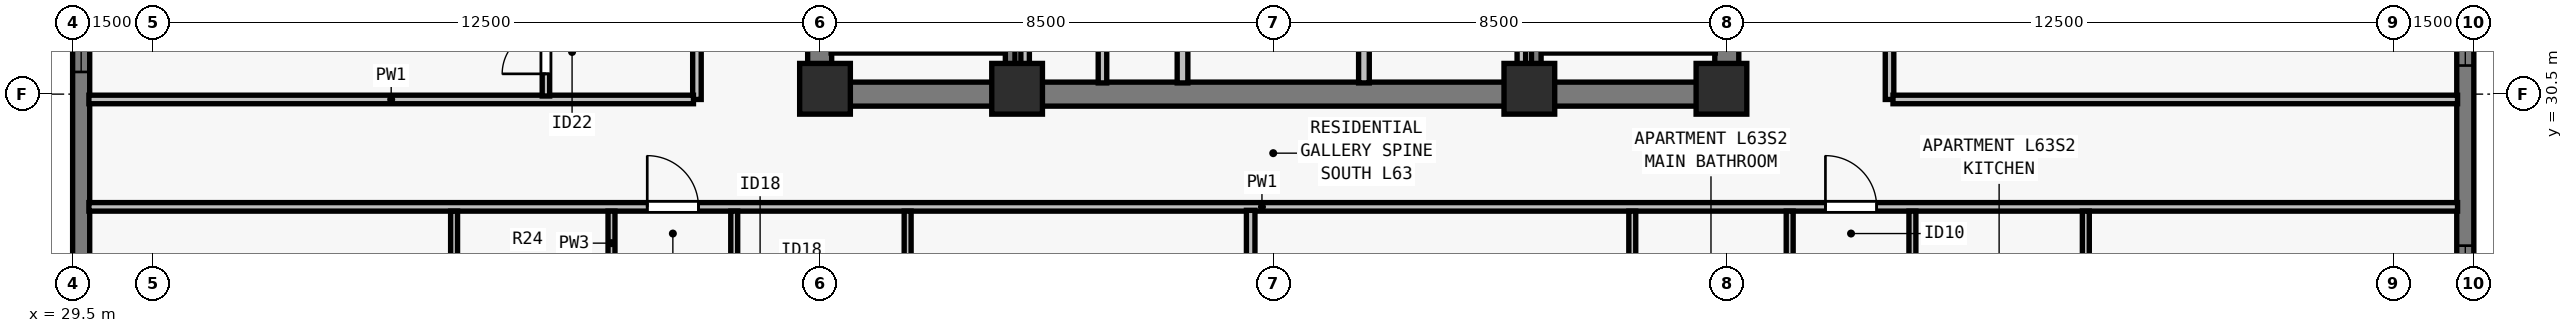
"""IFC4 building model, lengths in metres.
Left out: names, types, materials, properties, quantities, classifications, styles, units other than length and angle.
Written with IfcOpenShell. Run it as: python <this file> out.ifc"""

import sys

from ifc_helpers import new_model, si_unit, direction, frame, frame_2d, origin, origin_2d, place, context, subcontext, project, spatial, rectangle, extrude, element, fill, save


model = new_model("IFC4")
c1 = context("Model", 3, precision=1e-05, world=origin(), true_north=direction((0.0, 1.0)))
c2 = subcontext(c1, "Body", "Model", "MODEL_VIEW")
j1 = project(units=[si_unit("LENGTHUNIT", "METRE"), si_unit("PLANEANGLEUNIT", "RADIAN")], contexts=[c1])
p1 = place(None, origin())
s1 = spatial("IfcSite", under=j1, at=p1, CompositionType="ELEMENT")
p2 = place(p1, origin())
s2 = spatial("IfcBuilding", under=s1, at=p2, CompositionType="ELEMENT")
p3 = place(p2, frame((0.0, 0.0, 230.5)))
s3 = spatial("IfcBuildingStorey", under=s2, at=p3, CompositionType="ELEMENT", Elevation=230.5)
for number, where, z_axis, x_axis in (
    (1, (43.6, 30.6, 0.0), (0.0, 0.0, 1.0), (1.0, 0.0, 0.0)),
    (2, (47.2, 30.6, 0.0), (0.0, 0.0, 1.0), (1.0, 0.0, 0.0)),
    (3, (56.8, 30.6, 0.0), (0.0, 0.0, 1.0), (1.0, 0.0, 0.0)),
    (4, (60.4, 30.6, 0.0), (0.0, 0.0, 1.0), (1.0, 0.0, 0.0)),
):
    element("IfcColumn", number, at=place(p3, frame(where, z_axis=z_axis, x_axis=x_axis)), inside=s3, PredefinedType="COLUMN", context=c2, shape_type="SweptSolid", body=[
        extrude(rectangle(XDim=0.95, YDim=0.95, at=origin_2d()), origin(), (0.0, 0.0, 1.0), 3.5),
    ])
p4 = place(p3, frame((74.34, 56.5, 0.0), z_axis=(0.0, 0.0, 1.0), x_axis=(0.0, -1.0, 0.0)))
e5 = element("IfcWall", 5, at=p4, inside=s3, PredefinedType="SOLIDWALL", context=c2, shape_type="SweptSolid", body=[
    extrude(rectangle(XDim=34.702, YDim=0.32, at=frame_2d((17.351, 0.0))), origin(), (0.0, 0.0, 1.0), 3.29),
])
p5 = place(p4, frame((4.613, 0.0, 0.8)))
e6 = element("IfcOpeningElement", 6, at=p5, cuts=e5, PredefinedType="OPENING", context=c2, shape_type="SweptSolid", body=[
    extrude(rectangle(XDim=1.85, YDim=1.678, at=frame_2d((0.925, 0.839))), frame((0.0, 0.17, 0.0), z_axis=(0.0, -1.0, 0.0), x_axis=(1.0, 0.0, 0.0)), (0.0, 0.0, 1.0), 0.34),
])
p6 = place(p4, frame((9.388, 0.0, 0.8)))
e7 = element("IfcOpeningElement", 7, at=p6, cuts=e5, PredefinedType="OPENING", context=c2, shape_type="SweptSolid", body=[
    extrude(rectangle(XDim=1.55, YDim=1.678, at=frame_2d((0.775, 0.839))), frame((0.0, 0.17, 0.0), z_axis=(0.0, -1.0, 0.0), x_axis=(1.0, 0.0, 0.0)), (0.0, 0.0, 1.0), 0.34),
])
p7 = place(p4, frame((14.888, 0.0, 0.8)))
e8 = element("IfcOpeningElement", 8, at=p7, cuts=e5, PredefinedType="OPENING", context=c2, shape_type="SweptSolid", body=[
    extrude(rectangle(XDim=1.55, YDim=1.678, at=frame_2d((0.775, 0.839))), frame((0.0, 0.17, 0.0), z_axis=(0.0, -1.0, 0.0), x_axis=(1.0, 0.0, 0.0)), (0.0, 0.0, 1.0), 0.34),
])
p8 = place(p4, frame((18.114, 0.0, 0.8)))
e9 = element("IfcOpeningElement", 9, at=p8, cuts=e5, PredefinedType="OPENING", context=c2, shape_type="SweptSolid", body=[
    extrude(rectangle(XDim=1.85, YDim=1.678, at=frame_2d((0.925, 0.839))), frame((0.0, 0.17, 0.0), z_axis=(0.0, -1.0, 0.0), x_axis=(1.0, 0.0, 0.0)), (0.0, 0.0, 1.0), 0.34),
])
p9 = place(p4, frame((23.614, 0.0, 0.8)))
e10 = element("IfcOpeningElement", 10, at=p9, cuts=e5, PredefinedType="OPENING", context=c2, shape_type="SweptSolid", body=[
    extrude(rectangle(XDim=1.85, YDim=1.678, at=frame_2d((0.925, 0.839))), frame((0.0, 0.17, 0.0), z_axis=(0.0, -1.0, 0.0), x_axis=(1.0, 0.0, 0.0)), (0.0, 0.0, 1.0), 0.34),
])
p10 = place(p4, frame((28.839, 0.0, 0.8)))
e11 = element("IfcOpeningElement", 11, at=p10, cuts=e5, PredefinedType="OPENING", context=c2, shape_type="SweptSolid", body=[
    extrude(rectangle(XDim=1.55, YDim=1.678, at=frame_2d((0.775, 0.839))), frame((0.0, 0.17, 0.0), z_axis=(0.0, -1.0, 0.0), x_axis=(1.0, 0.0, 0.0)), (0.0, 0.0, 1.0), 0.34),
])
p11 = place(p4, frame((31.35, 0.0, 0.8)))
e12 = element("IfcOpeningElement", 12, at=p11, cuts=e5, PredefinedType="OPENING", context=c2, shape_type="SweptSolid", body=[
    extrude(rectangle(XDim=0.9, YDim=1.678, at=frame_2d((0.45, 0.839))), frame((0.0, 0.17, 0.0), z_axis=(0.0, -1.0, 0.0), x_axis=(1.0, 0.0, 0.0)), (0.0, 0.0, 1.0), 0.34),
])
p12 = place(p3, frame((29.66, 21.5, 0.0), z_axis=(0.0, 0.0, 1.0), x_axis=(0.0, 1.0, 0.0)))
e13 = element("IfcWall", 13, at=p12, inside=s3, PredefinedType="SOLIDWALL", context=c2, shape_type="SweptSolid", body=[
    extrude(rectangle(XDim=23.402, YDim=0.32, at=frame_2d((11.701, 0.0))), origin(), (0.0, 0.0, 1.0), 3.29),
])
p13 = place(p12, frame((9.416, 0.0, 0.8)))
e14 = element("IfcOpeningElement", 14, at=p13, cuts=e13, PredefinedType="OPENING", context=c2, shape_type="SweptSolid", body=[
    extrude(rectangle(XDim=1.55, YDim=1.678, at=frame_2d((0.775, 0.839))), frame((0.0, 0.17, 0.0), z_axis=(0.0, -1.0, 0.0), x_axis=(1.0, 0.0, 0.0)), (0.0, 0.0, 1.0), 0.34),
])
p14 = place(p12, frame((15.886, 0.0, 0.8)))
e15 = element("IfcOpeningElement", 15, at=p14, cuts=e13, PredefinedType="OPENING", context=c2, shape_type="SweptSolid", body=[
    extrude(rectangle(XDim=1.55, YDim=1.678, at=frame_2d((0.775, 0.839))), frame((0.0, 0.17, 0.0), z_axis=(0.0, -1.0, 0.0), x_axis=(1.0, 0.0, 0.0)), (0.0, 0.0, 1.0), 0.34),
])
p15 = place(p12, frame((19.397, 0.0, 0.8)))
e16 = element("IfcOpeningElement", 16, at=p15, cuts=e13, PredefinedType="OPENING", context=c2, shape_type="SweptSolid", body=[
    extrude(rectangle(XDim=1.85, YDim=1.678, at=frame_2d((0.925, 0.839))), frame((0.0, 0.17, 0.0), z_axis=(0.0, -1.0, 0.0), x_axis=(1.0, 0.0, 0.0)), (0.0, 0.0, 1.0), 0.34),
])
p16 = place(p3, frame((43.275, 30.5, 0.0), z_axis=(0.0, 0.0, 1.0), x_axis=(1.0, 0.0, 0.0)))
e17 = element("IfcWall", 17, at=p16, inside=s3, PredefinedType="SHEAR", context=c2, shape_type="SweptSolid", body=[
    extrude(rectangle(XDim=17.45, YDim=0.45, at=frame_2d((8.725, 0.0))), origin(), (0.0, 0.0, 1.0), 3.29),
])
for number, where, z_axis, x_axis in (
    (18, (43.5, 30.715, 0.0), (0.0, 0.0, 1.0), (0.0, 1.0, 0.0)),
    (19, (60.5, 30.715, 0.0), (0.0, 0.0, 1.0), (0.0, 1.0, 0.0)),
):
    element("IfcWall", number, at=place(p3, frame(where, z_axis=z_axis, x_axis=x_axis)), inside=s3, PredefinedType="SHEAR", context=c2, shape_type="SweptSolid", body=[
        extrude(rectangle(XDim=8.035, YDim=0.45, at=frame_2d((4.018, 0.0))), origin(), (0.0, 0.0, 1.0), 3.29),
    ])
p17 = place(p3, frame((50.3, 30.71, 0.0), z_axis=(0.0, 0.0, 1.0), x_axis=(0.0, 1.0, 0.0)))
e20 = element("IfcWall", 20, at=p17, inside=s3, PredefinedType="SOLIDWALL", context=c2, shape_type="SweptSolid", body=[
    extrude(rectangle(XDim=7.905, YDim=0.2, at=frame_2d((3.953, 0.0))), origin(), (0.0, 0.0, 1.0), 3.29),
])
p18 = place(p17, frame((2.14, 0.0, 0.0)))
e21 = element("IfcOpeningElement", 21, at=p18, cuts=e20, PredefinedType="OPENING", context=c2, shape_type="SweptSolid", body=[
    extrude(rectangle(XDim=0.95, YDim=2.12, at=frame_2d((0.475, 1.06))), frame((0.0, 0.11, 0.0), z_axis=(0.0, -1.0, 0.0), x_axis=(1.0, 0.0, 0.0)), (0.0, 0.0, 1.0), 0.22),
])
p19 = place(p3, frame((53.7, 30.71, 0.0), z_axis=(0.0, 0.0, 1.0), x_axis=(0.0, 1.0, 0.0)))
e22 = element("IfcWall", 22, at=p19, inside=s3, PredefinedType="SOLIDWALL", context=c2, shape_type="SweptSolid", body=[
    extrude(rectangle(XDim=7.905, YDim=0.2, at=frame_2d((3.953, 0.0))), origin(), (0.0, 0.0, 1.0), 3.29),
])
p20 = place(p19, frame((1.39, 0.0, 0.0)))
e23 = element("IfcOpeningElement", 23, at=p20, cuts=e22, PredefinedType="OPENING", context=c2, shape_type="SweptSolid", body=[
    extrude(rectangle(XDim=0.95, YDim=2.12, at=frame_2d((0.475, 1.06))), frame((0.0, 0.11, 0.0), z_axis=(0.0, -1.0, 0.0), x_axis=(1.0, 0.0, 0.0)), (0.0, 0.0, 1.0), 0.22),
])
p21 = place(p19, frame((5.39, 0.0, 0.0)))
e24 = element("IfcOpeningElement", 24, at=p21, cuts=e22, PredefinedType="OPENING", context=c2, shape_type="SweptSolid", body=[
    extrude(rectangle(XDim=0.85, YDim=2.12, at=frame_2d((0.425, 1.06))), frame((0.0, 0.11, 0.0), z_axis=(0.0, -1.0, 0.0), x_axis=(1.0, 0.0, 0.0)), (0.0, 0.0, 1.0), 0.22),
])
p22 = place(p3, frame((47.35, 30.71, 0.0), z_axis=(0.0, 0.0, 1.0), x_axis=(0.0, 1.0, 0.0)))
e25 = element("IfcWall", 25, at=p22, inside=s3, PredefinedType="PARTITIONING", context=c2, shape_type="SweptSolid", body=[
    extrude(rectangle(XDim=7.905, YDim=0.16, at=frame_2d((3.953, 0.0))), origin(), (0.0, 0.0, 1.0), 3.29),
])
p23 = place(p3, frame((48.8, 30.71, 0.0), z_axis=(0.0, 0.0, 1.0), x_axis=(0.0, 1.0, 0.0)))
e26 = element("IfcWall", 26, at=p23, inside=s3, PredefinedType="PARTITIONING", context=c2, shape_type="SweptSolid", body=[
    extrude(rectangle(XDim=7.905, YDim=0.16, at=frame_2d((3.953, 0.0))), origin(), (0.0, 0.0, 1.0), 3.29),
])
p24 = place(p23, frame((3.54, 0.0, 0.0)))
e27 = element("IfcOpeningElement", 27, at=p24, cuts=e26, PredefinedType="OPENING", context=c2, shape_type="SweptSolid", body=[
    extrude(rectangle(XDim=0.85, YDim=2.12, at=frame_2d((0.425, 1.06))), frame((0.0, 0.09, 0.0), z_axis=(0.0, -1.0, 0.0), x_axis=(1.0, 0.0, 0.0)), (0.0, 0.0, 1.0), 0.18),
])
p25 = place(p3, frame((56.65, 30.71, 0.0), z_axis=(0.0, 0.0, 1.0), x_axis=(0.0, 1.0, 0.0)))
e28 = element("IfcWall", 28, at=p25, inside=s3, PredefinedType="PARTITIONING", context=c2, shape_type="SweptSolid", body=[
    extrude(rectangle(XDim=7.905, YDim=0.16, at=frame_2d((3.953, 0.0))), origin(), (0.0, 0.0, 1.0), 3.29),
])
p26 = place(p3, frame((29.805, 28.387, 0.0), z_axis=(0.0, 0.0, 1.0), x_axis=(1.0, 0.0, 0.0)))
e29 = element("IfcWall", 29, at=p26, inside=s3, PredefinedType="PARTITIONING", context=c2, shape_type="SweptSolid", body=[
    extrude(rectangle(XDim=44.39, YDim=0.16, at=frame_2d((22.195, 0.0))), origin(), (0.0, 0.0, 1.0), 2.958),
])
p27 = place(p26, frame((10.464, 0.0, 0.0)))
e30 = element("IfcOpeningElement", 30, at=p27, cuts=e29, PredefinedType="OPENING", context=c2, shape_type="SweptSolid", body=[
    extrude(rectangle(XDim=0.96, YDim=2.18, at=frame_2d((0.48, 1.09))), frame((0.0, 0.09, 0.0), z_axis=(0.0, -1.0, 0.0), x_axis=(1.0, 0.0, 0.0)), (0.0, 0.0, 1.0), 0.18),
])
p28 = place(p26, frame((32.544, 0.0, 0.0)))
e31 = element("IfcOpeningElement", 31, at=p28, cuts=e29, PredefinedType="OPENING", context=c2, shape_type="SweptSolid", body=[
    extrude(rectangle(XDim=0.96, YDim=2.18, at=frame_2d((0.48, 1.09))), frame((0.0, 0.09, 0.0), z_axis=(0.0, -1.0, 0.0), x_axis=(1.0, 0.0, 0.0)), (0.0, 0.0, 1.0), 0.18),
])
p29 = place(p3, frame((41.2, 30.4, 0.0), z_axis=(0.0, 0.0, 1.0), x_axis=(0.0, 1.0, 0.0)))
e32 = element("IfcWall", 32, at=p29, inside=s3, PredefinedType="PARTITIONING", context=c2, shape_type="SweptSolid", body=[
    extrude(rectangle(XDim=17.2, YDim=0.16, at=frame_2d((8.6, 0.0))), origin(), (0.0, 0.0, 1.0), 3.29),
])
p30 = place(p29, frame((8.12, 0.0, 0.0)))
e33 = element("IfcOpeningElement", 33, at=p30, cuts=e32, PredefinedType="OPENING", context=c2, shape_type="SweptSolid", body=[
    extrude(rectangle(XDim=0.96, YDim=2.18, at=frame_2d((0.48, 1.09))), frame((0.0, 0.09, 0.0), z_axis=(0.0, -1.0, 0.0), x_axis=(1.0, 0.0, 0.0)), (0.0, 0.0, 1.0), 0.18),
])
p31 = place(p3, frame((63.55, 30.4, 0.0), z_axis=(0.0, 0.0, 1.0), x_axis=(0.0, 1.0, 0.0)))
e34 = element("IfcWall", 34, at=p31, inside=s3, PredefinedType="PARTITIONING", context=c2, shape_type="SweptSolid", body=[
    extrude(rectangle(XDim=17.2, YDim=0.16, at=frame_2d((8.6, 0.0))), origin(), (0.0, 0.0, 1.0), 3.29),
])
p32 = place(p31, frame((3.6, 0.0, 0.0)))
e35 = element("IfcOpeningElement", 35, at=p32, cuts=e34, PredefinedType="OPENING", context=c2, shape_type="SweptSolid", body=[
    extrude(rectangle(XDim=0.96, YDim=2.12, at=frame_2d((0.48, 1.06))), frame((0.0, 0.09, 0.0), z_axis=(0.0, -1.0, 0.0), x_axis=(1.0, 0.0, 0.0)), (0.0, 0.0, 1.0), 0.18),
])
p33 = place(p31, frame((12.44, 0.0, 0.0)))
e36 = element("IfcOpeningElement", 36, at=p33, cuts=e34, PredefinedType="OPENING", context=c2, shape_type="SweptSolid", body=[
    extrude(rectangle(XDim=0.96, YDim=2.18, at=frame_2d((0.48, 1.09))), frame((0.0, 0.09, 0.0), z_axis=(0.0, -1.0, 0.0), x_axis=(1.0, 0.0, 0.0)), (0.0, 0.0, 1.0), 0.18),
])
p34 = place(p3, frame((29.805, 30.4, 0.0), z_axis=(0.0, 0.0, 1.0), x_axis=(1.0, 0.0, 0.0)))
e37 = element("IfcWall", 37, at=p34, inside=s3, PredefinedType="PARTITIONING", context=c2, shape_type="SweptSolid", body=[
    extrude(rectangle(XDim=11.33, YDim=0.16, at=frame_2d((5.665, 0.0))), origin(), (0.0, 0.0, 1.0), 3.29),
])
p35 = place(p3, frame((63.615, 30.4, 0.0), z_axis=(0.0, 0.0, 1.0), x_axis=(1.0, 0.0, 0.0)))
e38 = element("IfcWall", 38, at=p35, inside=s3, PredefinedType="PARTITIONING", context=c2, shape_type="SweptSolid", body=[
    extrude(rectangle(XDim=10.58, YDim=0.16, at=frame_2d((5.29, 0.0))), origin(), (0.0, 0.0, 1.0), 3.29),
])
p36 = place(p3, frame((36.649, 25.558, 0.0), z_axis=(0.0, 0.0, 1.0), x_axis=(0.0, 1.0, 0.0)))
e39 = element("IfcWall", 39, at=p36, inside=s3, PredefinedType="PLUMBINGWALL", context=c2, shape_type="SweptSolid", body=[
    extrude(rectangle(XDim=2.75, YDim=0.13, at=frame_2d((1.375, 0.0))), origin(), (0.0, 0.0, 1.0), 3.29),
])
p37 = place(p3, frame((39.599, 25.558, 0.0), z_axis=(0.0, 0.0, 1.0), x_axis=(0.0, 1.0, 0.0)))
e40 = element("IfcWall", 40, at=p37, inside=s3, PredefinedType="PLUMBINGWALL", context=c2, shape_type="SweptSolid", body=[
    extrude(rectangle(XDim=2.75, YDim=0.13, at=frame_2d((1.375, 0.0))), origin(), (0.0, 0.0, 1.0), 3.29),
])
p38 = place(p37, frame((0.55, 0.0, 0.0)))
e41 = element("IfcOpeningElement", 41, at=p38, cuts=e40, PredefinedType="OPENING", context=c2, shape_type="SweptSolid", body=[
    extrude(rectangle(XDim=0.85, YDim=2.08, at=frame_2d((0.425, 1.04))), frame((0.0, 0.075, 0.0), z_axis=(0.0, -1.0, 0.0), x_axis=(1.0, 0.0, 0.0)), (0.0, 0.0, 1.0), 0.15),
])
p39 = place(p3, frame((45.149, 25.558, 0.0), z_axis=(0.0, 0.0, 1.0), x_axis=(0.0, 1.0, 0.0)))
e42 = element("IfcWall", 42, at=p39, inside=s3, PredefinedType="PLUMBINGWALL", context=c2, shape_type="SweptSolid", body=[
    extrude(rectangle(XDim=2.75, YDim=0.13, at=frame_2d((1.375, 0.0))), origin(), (0.0, 0.0, 1.0), 3.29),
])
p40 = place(p3, frame((41.899, 25.558, 0.0), z_axis=(0.0, 0.0, 1.0), x_axis=(0.0, 1.0, 0.0)))
e43 = element("IfcWall", 43, at=p40, inside=s3, PredefinedType="PLUMBINGWALL", context=c2, shape_type="SweptSolid", body=[
    extrude(rectangle(XDim=2.75, YDim=0.13, at=frame_2d((1.375, 0.0))), origin(), (0.0, 0.0, 1.0), 2.573),
])
p41 = place(p40, frame((0.55, 0.0, 0.0)))
e44 = element("IfcOpeningElement", 44, at=p41, cuts=e43, PredefinedType="OPENING", context=c2, shape_type="SweptSolid", body=[
    extrude(rectangle(XDim=0.88, YDim=2.1, at=frame_2d((0.44, 1.05))), frame((0.0, 0.075, 0.0), z_axis=(0.0, -1.0, 0.0), x_axis=(1.0, 0.0, 0.0)), (0.0, 0.0, 1.0), 0.15),
])
p42 = place(p3, frame((51.577, 16.805, 0.0), z_axis=(0.0, 0.0, 1.0), x_axis=(0.0, 1.0, 0.0)))
e45 = element("IfcWall", 45, at=p42, inside=s3, PredefinedType="PARTITIONING", context=c2, shape_type="SweptSolid", body=[
    extrude(rectangle(XDim=11.518, YDim=0.16, at=frame_2d((5.759, 0.0))), origin(), (0.0, 0.0, 1.0), 2.958),
])
p43 = place(p3, frame((58.729, 25.558, 0.0), z_axis=(0.0, 0.0, 1.0), x_axis=(0.0, 1.0, 0.0)))
e46 = element("IfcWall", 46, at=p43, inside=s3, PredefinedType="PLUMBINGWALL", context=c2, shape_type="SweptSolid", body=[
    extrude(rectangle(XDim=2.75, YDim=0.13, at=frame_2d((1.375, 0.0))), origin(), (0.0, 0.0, 1.0), 3.29),
])
p44 = place(p3, frame((61.679, 25.558, 0.0), z_axis=(0.0, 0.0, 1.0), x_axis=(0.0, 1.0, 0.0)))
e47 = element("IfcWall", 47, at=p44, inside=s3, PredefinedType="PLUMBINGWALL", context=c2, shape_type="SweptSolid", body=[
    extrude(rectangle(XDim=2.75, YDim=0.13, at=frame_2d((1.375, 0.0))), origin(), (0.0, 0.0, 1.0), 3.29),
])
p45 = place(p44, frame((0.55, 0.0, 0.0)))
e48 = element("IfcOpeningElement", 48, at=p45, cuts=e47, PredefinedType="OPENING", context=c2, shape_type="SweptSolid", body=[
    extrude(rectangle(XDim=0.85, YDim=2.08, at=frame_2d((0.425, 1.04))), frame((0.0, 0.075, 0.0), z_axis=(0.0, -1.0, 0.0), x_axis=(1.0, 0.0, 0.0)), (0.0, 0.0, 1.0), 0.15),
])
p46 = place(p3, frame((67.229, 25.558, 0.0), z_axis=(0.0, 0.0, 1.0), x_axis=(0.0, 1.0, 0.0)))
e49 = element("IfcWall", 49, at=p46, inside=s3, PredefinedType="PLUMBINGWALL", context=c2, shape_type="SweptSolid", body=[
    extrude(rectangle(XDim=2.75, YDim=0.13, at=frame_2d((1.375, 0.0))), origin(), (0.0, 0.0, 1.0), 3.29),
])
p47 = place(p3, frame((63.979, 25.558, 0.0), z_axis=(0.0, 0.0, 1.0), x_axis=(0.0, 1.0, 0.0)))
e50 = element("IfcWall", 50, at=p47, inside=s3, PredefinedType="PLUMBINGWALL", context=c2, shape_type="SweptSolid", body=[
    extrude(rectangle(XDim=2.75, YDim=0.13, at=frame_2d((1.375, 0.0))), origin(), (0.0, 0.0, 1.0), 3.29),
])
p48 = place(p47, frame((0.55, 0.0, 0.0)))
e51 = element("IfcOpeningElement", 51, at=p48, cuts=e50, PredefinedType="OPENING", context=c2, shape_type="SweptSolid", body=[
    extrude(rectangle(XDim=0.88, YDim=2.1, at=frame_2d((0.44, 1.05))), frame((0.0, 0.075, 0.0), z_axis=(0.0, -1.0, 0.0), x_axis=(1.0, 0.0, 0.0)), (0.0, 0.0, 1.0), 0.15),
])
p49 = place(p3, frame((38.37, 30.465, 0.0), z_axis=(0.0, 0.0, 1.0), x_axis=(0.0, 1.0, 0.0)))
e52 = element("IfcWall", 52, at=p49, inside=s3, PredefinedType="PARTITIONING", context=c2, shape_type="SweptSolid", body=[
    extrude(rectangle(XDim=4.16, YDim=0.14, at=frame_2d((2.08, 0.0))), origin(), (0.0, 0.0, 1.0), 3.29),
])
p50 = place(p49, frame((0.415, 0.0, 0.0)))
e53 = element("IfcOpeningElement", 53, at=p50, cuts=e52, PredefinedType="OPENING", context=c2, shape_type="SweptSolid", body=[
    extrude(rectangle(XDim=0.82, YDim=2.1, at=frame_2d((0.41, 1.05))), frame((0.0, 0.08, 0.0), z_axis=(0.0, -1.0, 0.0), x_axis=(1.0, 0.0, 0.0)), (0.0, 0.0, 1.0), 0.16),
])
p51 = place(p3, frame((43.715, 31.36, 0.0), z_axis=(0.0, 0.0, 1.0), x_axis=(1.0, 0.0, 0.0)))
e54 = element("IfcWall", 54, at=p51, inside=s3, PredefinedType="SOLIDWALL", context=c2, shape_type="SweptSolid", body=[
    extrude(rectangle(XDim=3.28, YDim=0.18, at=frame_2d((1.64, 0.0))), origin(), (0.0, 0.0, 1.0), 3.29),
])
p52 = place(p3, frame((47.07, 38.78, 0.0), z_axis=(0.0, 0.0, 1.0), x_axis=(0.0, -1.0, 0.0)))
e55 = element("IfcWall", 55, at=p52, inside=s3, PredefinedType="SOLIDWALL", context=c2, shape_type="SweptSolid", body=[
    extrude(rectangle(XDim=8.067, YDim=0.18, at=frame_2d((4.034, 0.0))), origin(), (0.0, 0.0, 1.0), 3.29),
])
p53 = place(p3, frame((57.005, 31.36, 0.0), z_axis=(0.0, 0.0, 1.0), x_axis=(1.0, 0.0, 0.0)))
e56 = element("IfcWall", 56, at=p53, inside=s3, PredefinedType="SOLIDWALL", context=c2, shape_type="SweptSolid", body=[
    extrude(rectangle(XDim=3.28, YDim=0.18, at=frame_2d((1.64, 0.0))), origin(), (0.0, 0.0, 1.0), 3.29),
])
p54 = place(p3, frame((56.93, 38.78, 0.0), z_axis=(0.0, 0.0, 1.0), x_axis=(0.0, -1.0, 0.0)))
e57 = element("IfcWall", 57, at=p54, inside=s3, PredefinedType="SOLIDWALL", context=c2, shape_type="SweptSolid", body=[
    extrude(rectangle(XDim=8.067, YDim=0.18, at=frame_2d((4.034, 0.0))), origin(), (0.0, 0.0, 1.0), 3.29),
])
p55 = place(p9, origin())
e58 = element("IfcWindow", 58, at=p55, inside=s3, PartitioningType="SINGLE_PANEL", PredefinedType="WINDOW", context=c2, shape_type="SweptSolid", body=[
    extrude(rectangle(XDim=1.85, YDim=1.678, at=frame_2d((0.925, 0.839))), frame((0.0, -0.05, 0.0), z_axis=(0.0, -1.0, 0.0), x_axis=(1.0, 0.0, 0.0)), (0.0, 0.0, 1.0), 0.06),
])
fill(e10, e58)
p56 = place(p10, origin())
e59 = element("IfcWindow", 59, at=p56, inside=s3, PartitioningType="SINGLE_PANEL", PredefinedType="WINDOW", context=c2, shape_type="SweptSolid", body=[
    extrude(rectangle(XDim=1.55, YDim=1.678, at=frame_2d((0.775, 0.839))), frame((0.0, -0.05, 0.0), z_axis=(0.0, -1.0, 0.0), x_axis=(1.0, 0.0, 0.0)), (0.0, 0.0, 1.0), 0.06),
])
fill(e11, e59)
p57 = place(p13, origin())
e60 = element("IfcWindow", 60, at=p57, inside=s3, PartitioningType="SINGLE_PANEL", PredefinedType="WINDOW", context=c2, shape_type="SweptSolid", body=[
    extrude(rectangle(XDim=1.55, YDim=1.678, at=frame_2d((0.775, 0.839))), frame((0.0, -0.05, 0.0), z_axis=(0.0, -1.0, 0.0), x_axis=(1.0, 0.0, 0.0)), (0.0, 0.0, 1.0), 0.06),
])
fill(e14, e60)
p58 = place(p27, origin())
e61 = element("IfcDoor", 61, at=p58, inside=s3, OperationType="SINGLE_SWING_LEFT", PredefinedType="DOOR", context=c2, shape_type="SweptSolid", body=[
    extrude(rectangle(XDim=0.96, YDim=2.18, at=frame_2d((0.48, 1.09))), frame((0.0, 0.025, 0.0), z_axis=(0.0, -1.0, 0.0), x_axis=(1.0, 0.0, 0.0)), (0.0, 0.0, 1.0), 0.05),
])
fill(e30, e61)
p59 = place(p28, origin())
e62 = element("IfcDoor", 62, at=p59, inside=s3, OperationType="SINGLE_SWING_LEFT", PredefinedType="DOOR", context=c2, shape_type="SweptSolid", body=[
    extrude(rectangle(XDim=0.96, YDim=2.18, at=frame_2d((0.48, 1.09))), frame((0.0, 0.025, 0.0), z_axis=(0.0, -1.0, 0.0), x_axis=(1.0, 0.0, 0.0)), (0.0, 0.0, 1.0), 0.05),
])
fill(e31, e62)
p60 = place(p50, origin())
e63 = element("IfcDoor", 63, at=p60, inside=s3, OperationType="SINGLE_SWING_LEFT", PredefinedType="DOOR", context=c2, shape_type="SweptSolid", body=[
    extrude(rectangle(XDim=0.82, YDim=2.1, at=frame_2d((0.41, 1.05))), frame((0.0, 0.025, 0.0), z_axis=(0.0, -1.0, 0.0), x_axis=(1.0, 0.0, 0.0)), (0.0, 0.0, 1.0), 0.05),
])
fill(e53, e63)
save(model, sys.argv[1])
